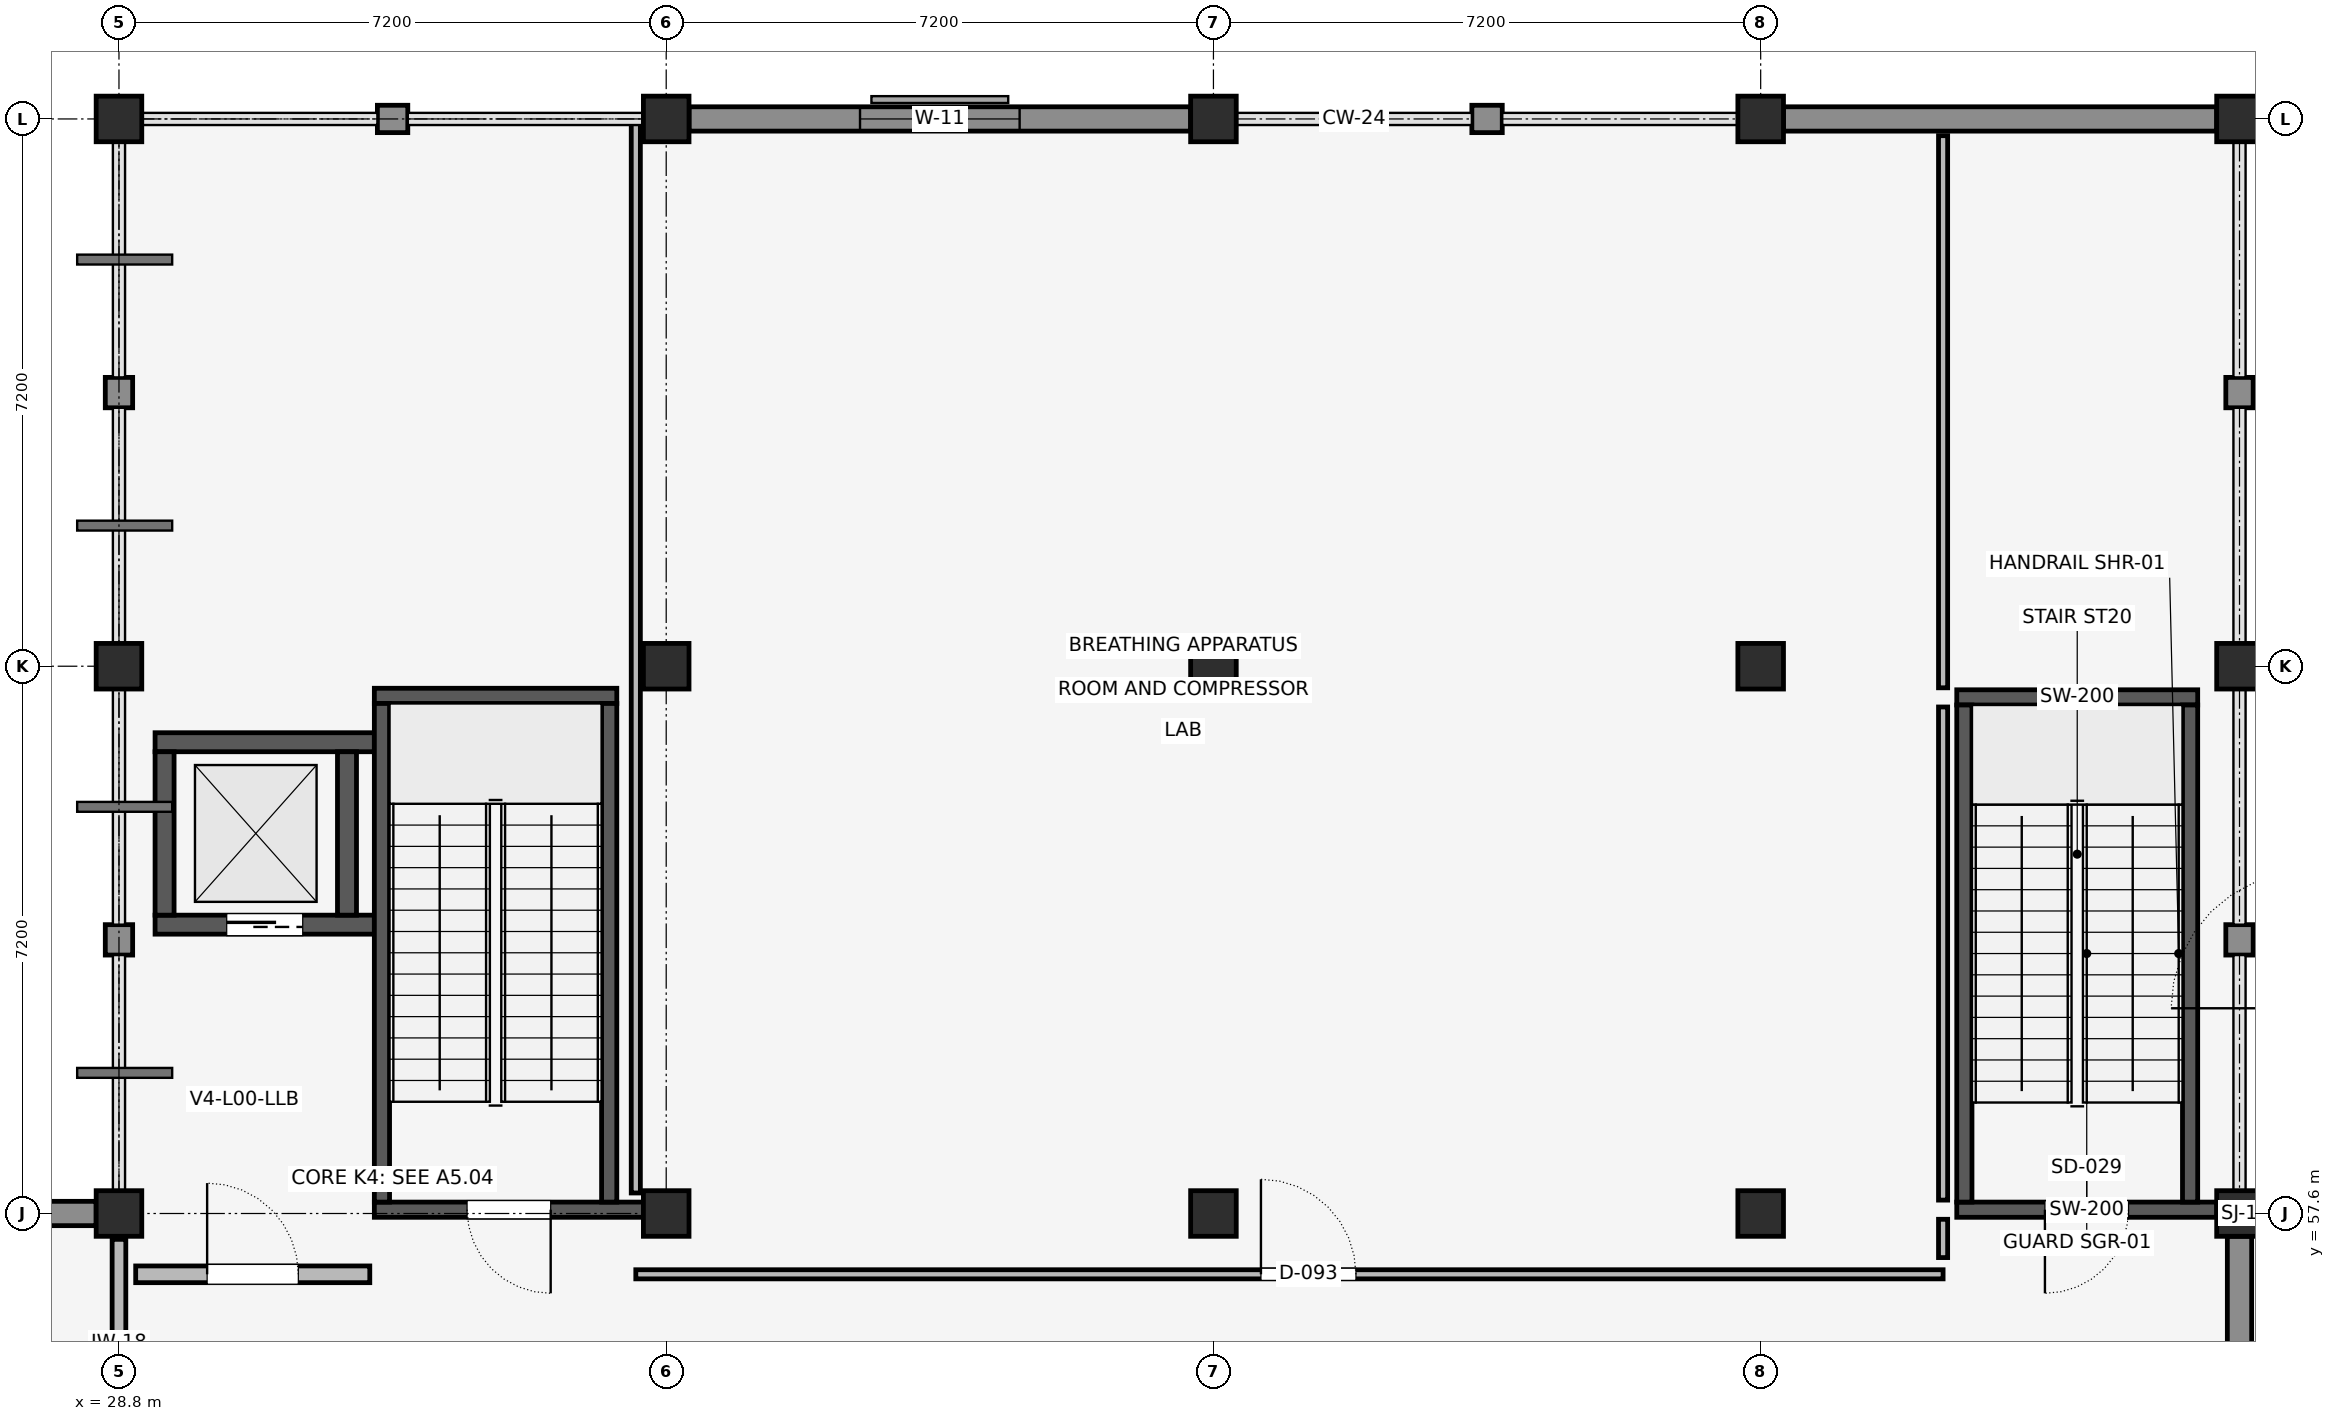
"""IFC4 building model, lengths in metres.
Left out: names, types, materials, properties, quantities, classifications, styles, units other than length and angle.
Written with IfcOpenShell. Run it as: python <this file> out.ifc"""

import sys

from ifc_helpers import new_model, si_unit, direction, frame, frame_2d, origin, origin_2d, place, context, subcontext, project, spatial, rectangle, extrude, element, fill, save


model = new_model("IFC4")
c1 = context("Model", 3, precision=1e-05, world=origin(), true_north=direction((0.0, 1.0)))
c2 = subcontext(c1, "Body", "Model", "MODEL_VIEW")
j1 = project(units=[si_unit("LENGTHUNIT", "METRE"), si_unit("PLANEANGLEUNIT", "RADIAN")], contexts=[c1])
p1 = place(None, origin())
s1 = spatial("IfcSite", under=j1, at=p1, CompositionType="ELEMENT")
p2 = place(p1, origin())
s2 = spatial("IfcBuilding", under=s1, at=p2, CompositionType="ELEMENT")
p3 = place(p2, origin())
s3 = spatial("IfcBuildingStorey", under=s2, at=p3, CompositionType="ELEMENT", Elevation=0.0)
for number, where, z_axis, x_axis in (
    (1, (28.8, 57.6, 0.0), (0.0, 0.0, 1.0), (1.0, 0.0, 0.0)),
    (2, (28.8, 64.8, 0.0), (0.0, 0.0, 1.0), (1.0, 0.0, 0.0)),
    (3, (28.8, 72.0, 0.0), (0.0, 0.0, 1.0), (1.0, 0.0, 0.0)),
    (4, (36.0, 57.6, 0.0), (0.0, 0.0, 1.0), (1.0, 0.0, 0.0)),
    (5, (36.0, 64.8, 0.0), (0.0, 0.0, 1.0), (1.0, 0.0, 0.0)),
    (6, (36.0, 72.0, 0.0), (0.0, 0.0, 1.0), (1.0, 0.0, 0.0)),
    (7, (43.2, 57.6, 0.0), (0.0, 0.0, 1.0), (1.0, 0.0, 0.0)),
    (8, (43.2, 64.8, 0.0), (0.0, 0.0, 1.0), (1.0, 0.0, 0.0)),
    (9, (43.2, 72.0, 0.0), (0.0, 0.0, 1.0), (1.0, 0.0, 0.0)),
    (10, (50.4, 57.6, 0.0), (0.0, 0.0, 1.0), (1.0, 0.0, 0.0)),
    (11, (50.4, 64.8, 0.0), (0.0, 0.0, 1.0), (1.0, 0.0, 0.0)),
    (12, (50.4, 72.0, 0.0), (0.0, 0.0, 1.0), (1.0, 0.0, 0.0)),
    (13, (56.7, 57.6, 0.0), (0.0, 0.0, 1.0), (1.0, 0.0, 0.0)),
    (14, (56.7, 64.8, 0.0), (0.0, 0.0, 1.0), (1.0, 0.0, 0.0)),
    (15, (56.7, 72.0, 0.0), (0.0, 0.0, 1.0), (1.0, 0.0, 0.0)),
):
    element("IfcColumn", number, at=place(p3, frame(where, z_axis=z_axis, x_axis=x_axis)), inside=s3, PredefinedType="COLUMN", context=c2, shape_type="SweptSolid", body=[
        extrude(rectangle(XDim=0.6, YDim=0.6, at=origin_2d()), origin(), (0.0, 0.0, 1.0), 5.4),
    ])
p4 = place(p3, frame((29.275, 61.4, 0.0), z_axis=(0.0, 0.0, 1.0), x_axis=(1.0, 0.0, 0.0)))
e16 = element("IfcWall", 16, at=p4, inside=s3, PredefinedType="SHEAR", context=c2, shape_type="SweptSolid", body=[
    extrude(rectangle(XDim=2.885, YDim=0.25, at=frame_2d((1.442, 0.0))), origin(), (0.0, 0.0, 1.0), 5.15),
])
p5 = place(p4, frame((0.942, 0.0, 0.0)))
e17 = element("IfcOpeningElement", 17, at=p5, cuts=e16, PredefinedType="OPENING", context=c2, shape_type="SweptSolid", body=[
    extrude(rectangle(XDim=1.0, YDim=2.1, at=frame_2d((0.5, 1.05))), frame((0.0, 0.137, 0.0), z_axis=(0.0, -1.0, 0.0), x_axis=(1.0, 0.0, 0.0)), (0.0, 0.0, 1.0), 0.274),
])
p6 = place(p3, frame((29.275, 63.8, 0.0), z_axis=(0.0, 0.0, 1.0), x_axis=(1.0, 0.0, 0.0)))
e18 = element("IfcWall", 18, at=p6, inside=s3, PredefinedType="SHEAR", context=c2, shape_type="SweptSolid", body=[
    extrude(rectangle(XDim=2.885, YDim=0.25, at=frame_2d((1.442, 0.0))), origin(), (0.0, 0.0, 1.0), 5.15),
])
for number, where, z_axis, x_axis in (
    (19, (29.4, 61.525, 0.0), (0.0, 0.0, 1.0), (0.0, 1.0, 0.0)),
    (20, (31.8, 61.525, 0.0), (0.0, 0.0, 1.0), (0.0, 1.0, 0.0)),
):
    element("IfcWall", number, at=place(p3, frame(where, z_axis=z_axis, x_axis=x_axis)), inside=s3, PredefinedType="SHEAR", context=c2, shape_type="SweptSolid", body=[
        extrude(rectangle(XDim=2.15, YDim=0.25, at=frame_2d((1.075, 0.0))), origin(), (0.0, 0.0, 1.0), 5.15),
    ])
p7 = place(p3, frame((32.16, 57.65, 0.0), z_axis=(0.0, 0.0, 1.0), x_axis=(1.0, 0.0, 0.0)))
e21 = element("IfcWall", 21, at=p7, inside=s3, PredefinedType="SHEAR", context=c2, shape_type="SweptSolid", body=[
    extrude(rectangle(XDim=3.54, YDim=0.2, at=frame_2d((1.77, 0.0))), origin(), (0.0, 0.0, 1.0), 5.15),
])
p8 = place(p7, frame((1.22, 0.0, 0.0)))
e22 = element("IfcOpeningElement", 22, at=p8, cuts=e21, PredefinedType="OPENING", context=c2, shape_type="SweptSolid", body=[
    extrude(rectangle(XDim=1.1, YDim=2.15, at=frame_2d((0.55, 1.075))), frame((0.0, 0.112, 0.0), z_axis=(0.0, -1.0, 0.0), x_axis=(1.0, 0.0, 0.0)), (0.0, 0.0, 1.0), 0.224),
])
p9 = place(p3, frame((32.16, 64.41, 0.0), z_axis=(0.0, 0.0, 1.0), x_axis=(1.0, 0.0, 0.0)))
e23 = element("IfcWall", 23, at=p9, inside=s3, PredefinedType="SHEAR", context=c2, shape_type="SweptSolid", body=[
    extrude(rectangle(XDim=3.19, YDim=0.2, at=frame_2d((1.595, 0.0))), origin(), (0.0, 0.0, 1.0), 5.15),
])
for number, where, z_axis, x_axis in (
    (24, (32.26, 57.75, 0.0), (0.0, 0.0, 1.0), (0.0, 1.0, 0.0)),
    (25, (35.25, 57.75, 0.0), (0.0, 0.0, 1.0), (0.0, 1.0, 0.0)),
):
    element("IfcWall", number, at=place(p3, frame(where, z_axis=z_axis, x_axis=x_axis)), inside=s3, PredefinedType="SHEAR", context=c2, shape_type="SweptSolid", body=[
        extrude(rectangle(XDim=6.56, YDim=0.2, at=frame_2d((3.28, 0.0))), origin(), (0.0, 0.0, 1.0), 5.15),
    ])
p10 = place(p3, frame((52.98, 57.65, 0.0), z_axis=(0.0, 0.0, 1.0), x_axis=(1.0, 0.0, 0.0)))
e26 = element("IfcWall", 26, at=p10, inside=s3, PredefinedType="SHEAR", context=c2, shape_type="SweptSolid", body=[
    extrude(rectangle(XDim=3.42, YDim=0.2, at=frame_2d((1.71, 0.0))), origin(), (0.0, 0.0, 1.0), 5.15),
])
p11 = place(p10, frame((1.16, 0.0, 0.0)))
e27 = element("IfcOpeningElement", 27, at=p11, cuts=e26, PredefinedType="OPENING", context=c2, shape_type="SweptSolid", body=[
    extrude(rectangle(XDim=1.1, YDim=2.15, at=frame_2d((0.55, 1.075))), frame((0.0, 0.112, 0.0), z_axis=(0.0, -1.0, 0.0), x_axis=(1.0, 0.0, 0.0)), (0.0, 0.0, 1.0), 0.224),
])
p12 = place(p3, frame((52.98, 64.39, 0.0), z_axis=(0.0, 0.0, 1.0), x_axis=(1.0, 0.0, 0.0)))
e28 = element("IfcWall", 28, at=p12, inside=s3, PredefinedType="SHEAR", context=c2, shape_type="SweptSolid", body=[
    extrude(rectangle(XDim=3.17, YDim=0.2, at=frame_2d((1.585, 0.0))), origin(), (0.0, 0.0, 1.0), 5.15),
])
for number, where, z_axis, x_axis in (
    (29, (53.08, 57.75, 0.0), (0.0, 0.0, 1.0), (0.0, 1.0, 0.0)),
    (30, (56.05, 57.75, 0.0), (0.0, 0.0, 1.0), (0.0, 1.0, 0.0)),
):
    element("IfcWall", number, at=place(p3, frame(where, z_axis=z_axis, x_axis=x_axis)), inside=s3, PredefinedType="SHEAR", context=c2, shape_type="SweptSolid", body=[
        extrude(rectangle(XDim=6.54, YDim=0.2, at=frame_2d((3.27, 0.0))), origin(), (0.0, 0.0, 1.0), 5.15),
    ])
p13 = place(p3, frame((21.9, 57.6, 0.0), z_axis=(0.0, 0.0, 1.0), x_axis=(1.0, 0.0, 0.0)))
e31 = element("IfcWall", 31, at=p13, inside=s3, PredefinedType="ELEMENTEDWALL", context=c2, shape_type="SweptSolid", body=[
    extrude(rectangle(XDim=6.6, YDim=0.32, at=frame_2d((3.3, 0.0))), origin(), (0.0, 0.0, 1.0), 4.4),
])
p14 = place(p13, frame((2.625, 0.0, 0.85)))
e32 = element("IfcOpeningElement", 32, at=p14, cuts=e31, PredefinedType="OPENING", context=c2, shape_type="SweptSolid", body=[
    extrude(rectangle(XDim=1.35, YDim=2.0, at=frame_2d((0.675, 1.0))), frame((0.0, 0.172, 0.0), z_axis=(0.0, -1.0, 0.0), x_axis=(1.0, 0.0, 0.0)), (0.0, 0.0, 1.0), 0.344),
])
p15 = place(p3, frame((28.8, 61.0, 0.0), z_axis=(0.0, 0.0, 1.0), x_axis=(0.0, 1.0, 0.0)))
e33 = element("IfcWall", 33, at=p15, inside=s3, PredefinedType="SOLIDWALL", context=c2, shape_type="SweptSolid", body=[
    extrude(rectangle(XDim=0.4, YDim=0.36, at=frame_2d((0.2, 0.0))), origin(), (0.0, 0.0, 1.0), 4.54),
])
for number, where, z_axis, x_axis in (
    (34, (28.8, 68.2, 0.0), (0.0, 0.0, 1.0), (0.0, 1.0, 0.0)),
    (35, (32.2, 72.0, 0.0), (0.0, 0.0, 1.0), (1.0, 0.0, 0.0)),
):
    element("IfcWall", number, at=place(p3, frame(where, z_axis=z_axis, x_axis=x_axis)), inside=s3, PredefinedType="SOLIDWALL", context=c2, shape_type="SweptSolid", body=[
        extrude(rectangle(XDim=0.4, YDim=0.36, at=frame_2d((0.2, 0.0))), origin(), (0.0, 0.0, 1.0), 4.49),
    ])
p16 = place(p3, frame((36.3, 72.0, 0.0), z_axis=(0.0, 0.0, 1.0), x_axis=(1.0, 0.0, 0.0)))
e36 = element("IfcWall", 36, at=p16, inside=s3, PredefinedType="ELEMENTEDWALL", context=c2, shape_type="SweptSolid", body=[
    extrude(rectangle(XDim=6.6, YDim=0.32, at=frame_2d((3.3, 0.0))), origin(), (0.0, 0.0, 1.0), 4.49),
])
p17 = place(p16, frame((2.25, 0.0, 0.85)))
e37 = element("IfcOpeningElement", 37, at=p17, cuts=e36, PredefinedType="OPENING", context=c2, shape_type="SweptSolid", body=[
    extrude(rectangle(XDim=2.1, YDim=2.15, at=frame_2d((1.05, 1.075))), frame((0.0, 0.172, 0.0), z_axis=(0.0, -1.0, 0.0), x_axis=(1.0, 0.0, 0.0)), (0.0, 0.0, 1.0), 0.344),
])
p18 = place(p3, frame((46.6, 72.0, 0.0), z_axis=(0.0, 0.0, 1.0), x_axis=(1.0, 0.0, 0.0)))
e38 = element("IfcWall", 38, at=p18, inside=s3, PredefinedType="SOLIDWALL", context=c2, shape_type="SweptSolid", body=[
    extrude(rectangle(XDim=0.4, YDim=0.36, at=frame_2d((0.2, 0.0))), origin(), (0.0, 0.0, 1.0), 4.49),
])
p19 = place(p3, frame((50.7, 72.0, 0.0), z_axis=(0.0, 0.0, 1.0), x_axis=(1.0, 0.0, 0.0)))
e39 = element("IfcWall", 39, at=p19, inside=s3, PredefinedType="ELEMENTEDWALL", context=c2, shape_type="SweptSolid", body=[
    extrude(rectangle(XDim=5.7, YDim=0.32, at=frame_2d((2.85, 0.0))), origin(), (0.0, 0.0, 1.0), 4.49),
])
p20 = place(p3, frame((56.7, 68.6, 0.0), z_axis=(0.0, 0.0, 1.0), x_axis=(0.0, -1.0, 0.0)))
e40 = element("IfcWall", 40, at=p20, inside=s3, PredefinedType="SOLIDWALL", context=c2, shape_type="SweptSolid", body=[
    extrude(rectangle(XDim=0.4, YDim=0.36, at=frame_2d((0.2, 0.0))), origin(), (0.0, 0.0, 1.0), 4.49),
])
p21 = place(p3, frame((56.7, 61.4, 0.0), z_axis=(0.0, 0.0, 1.0), x_axis=(0.0, -1.0, 0.0)))
e41 = element("IfcWall", 41, at=p21, inside=s3, PredefinedType="SOLIDWALL", context=c2, shape_type="SweptSolid", body=[
    extrude(rectangle(XDim=0.4, YDim=0.36, at=frame_2d((0.2, 0.0))), origin(), (0.0, 0.0, 1.0), 4.54),
])
p22 = place(p3, frame((56.7, 57.3, 0.0), z_axis=(0.0, 0.0, 1.0), x_axis=(0.0, -1.0, 0.0)))
e42 = element("IfcWall", 42, at=p22, inside=s3, PredefinedType="ELEMENTEDWALL", context=c2, shape_type="SweptSolid", body=[
    extrude(rectangle(XDim=6.6, YDim=0.32, at=frame_2d((3.3, 0.0))), origin(), (0.0, 0.0, 1.0), 4.49),
])
p23 = place(p22, frame((2.4, 0.0, 0.0)))
e43 = element("IfcOpeningElement", 43, at=p23, cuts=e42, PredefinedType="OPENING", context=c2, shape_type="SweptSolid", body=[
    extrude(rectangle(XDim=1.8, YDim=2.2, at=frame_2d((0.9, 1.1))), frame((0.0, 0.172, 0.0), z_axis=(0.0, -1.0, 0.0), x_axis=(1.0, 0.0, 0.0)), (0.0, 0.0, 1.0), 0.344),
])
p24 = place(p3, frame((28.8, 54.52, 0.0), z_axis=(0.0, 0.0, 1.0), x_axis=(0.0, 1.0, 0.0)))
e44 = element("IfcWall", 44, at=p24, inside=s3, PredefinedType="PLUMBINGWALL", context=c2, shape_type="SweptSolid", body=[
    extrude(rectangle(XDim=2.74, YDim=0.18, at=frame_2d((1.37, 0.0))), origin(), (0.0, 0.0, 1.0), 4.488),
])
p25 = place(p3, frame((29.02, 56.8, 0.0), z_axis=(0.0, 0.0, 1.0), x_axis=(1.0, 0.0, 0.0)))
e45 = element("IfcWall", 45, at=p25, inside=s3, PredefinedType="STANDARD", context=c2, shape_type="SweptSolid", body=[
    extrude(rectangle(XDim=3.08, YDim=0.22, at=frame_2d((1.54, 0.0))), origin(), (0.0, 0.0, 1.0), 5.12),
])
p26 = place(p25, frame((0.94, 0.0, 0.0)))
e46 = element("IfcOpeningElement", 46, at=p26, cuts=e45, PredefinedType="OPENING", context=c2, shape_type="SweptSolid", body=[
    extrude(rectangle(XDim=1.2, YDim=2.2, at=frame_2d((0.6, 1.1))), frame((0.0, 0.122, 0.0), z_axis=(0.0, -1.0, 0.0), x_axis=(1.0, 0.0, 0.0)), (0.0, 0.0, 1.0), 0.244),
])
p27 = place(p3, frame((35.6, 56.8, 0.0), z_axis=(0.0, 0.0, 1.0), x_axis=(1.0, 0.0, 0.0)))
e47 = element("IfcWall", 47, at=p27, inside=s3, PredefinedType="PARTITIONING", context=c2, shape_type="SweptSolid", body=[
    extrude(rectangle(XDim=17.2, YDim=0.12, at=frame_2d((8.6, 0.0))), origin(), (0.0, 0.0, 1.0), 4.488),
])
p28 = place(p27, frame((8.225, 0.0, 0.0)))
e48 = element("IfcOpeningElement", 48, at=p28, cuts=e47, PredefinedType="OPENING", context=c2, shape_type="SweptSolid", body=[
    extrude(rectangle(XDim=1.25, YDim=2.15, at=frame_2d((0.625, 1.075))), frame((0.0, 0.072, 0.0), z_axis=(0.0, -1.0, 0.0), x_axis=(1.0, 0.0, 0.0)), (0.0, 0.0, 1.0), 0.144),
])
p29 = place(p3, frame((52.8, 57.02, 0.0), z_axis=(0.0, 0.0, 1.0), x_axis=(0.0, 1.0, 0.0)))
e49 = element("IfcWall", 49, at=p29, inside=s3, PredefinedType="PARTITIONING", context=c2, shape_type="SweptSolid", body=[
    extrude(rectangle(XDim=0.504, YDim=0.12, at=frame_2d((0.252, 0.0))), origin(), (0.0, 0.0, 1.0), 5.12),
])
p30 = place(p3, frame((52.8, 57.776, 0.0), z_axis=(0.0, 0.0, 1.0), x_axis=(0.0, 1.0, 0.0)))
e50 = element("IfcWall", 50, at=p30, inside=s3, PredefinedType="PARTITIONING", context=c2, shape_type="SweptSolid", body=[
    extrude(rectangle(XDim=6.488, YDim=0.12, at=frame_2d((3.244, 0.0))), origin(), (0.0, 0.0, 1.0), 5.12),
])
p31 = place(p3, frame((52.8, 64.516, 0.0), z_axis=(0.0, 0.0, 1.0), x_axis=(0.0, 1.0, 0.0)))
e51 = element("IfcWall", 51, at=p31, inside=s3, PredefinedType="PARTITIONING", context=c2, shape_type="SweptSolid", body=[
    extrude(rectangle(XDim=7.264, YDim=0.12, at=frame_2d((3.632, 0.0))), origin(), (0.0, 0.0, 1.0), 4.388),
])
p32 = place(p3, frame((35.6, 57.87, 0.0), z_axis=(0.0, 0.0, 1.0), x_axis=(0.0, 1.0, 0.0)))
e52 = element("IfcWall", 52, at=p32, inside=s3, PredefinedType="PARTITIONING", context=c2, shape_type="SweptSolid", body=[
    extrude(rectangle(XDim=14.13, YDim=0.12, at=frame_2d((7.065, 0.0))), origin(), (0.0, 0.0, 1.0), 4.438),
])
p33 = place(p17, origin())
e53 = element("IfcWindow", 53, at=p33, inside=s3, PartitioningType="SINGLE_PANEL", PredefinedType="WINDOW", context=c2, shape_type="SweptSolid", body=[
    extrude(rectangle(XDim=2.1, YDim=2.15, at=frame_2d((1.05, 1.075))), frame((0.0, 0.03, 0.0), z_axis=(0.0, -1.0, 0.0), x_axis=(1.0, 0.0, 0.0)), (0.0, 0.0, 1.0), 0.06),
])
fill(e37, e53)
p34 = place(p8, frame((1.1, 0.0, 0.0), z_axis=(0.0, 0.0, 1.0), x_axis=(-1.0, 0.0, 0.0)))
e54 = element("IfcDoor", 54, at=p34, inside=s3, OperationType="SINGLE_SWING_LEFT", PredefinedType="DOOR", context=c2, shape_type="SweptSolid", body=[
    extrude(rectangle(XDim=1.1, YDim=2.15, at=frame_2d((0.55, 1.075))), frame((0.0, 0.025, 0.0), z_axis=(0.0, -1.0, 0.0), x_axis=(1.0, 0.0, 0.0)), (0.0, 0.0, 1.0), 0.05),
])
fill(e22, e54)
p35 = place(p11, frame((1.1, 0.0, 0.0), z_axis=(0.0, 0.0, 1.0), x_axis=(-1.0, 0.0, 0.0)))
e55 = element("IfcDoor", 55, at=p35, inside=s3, OperationType="SINGLE_SWING_RIGHT", PredefinedType="DOOR", context=c2, shape_type="SweptSolid", body=[
    extrude(rectangle(XDim=1.1, YDim=2.15, at=frame_2d((0.55, 1.075))), frame((0.0, 0.025, 0.0), z_axis=(0.0, -1.0, 0.0), x_axis=(1.0, 0.0, 0.0)), (0.0, 0.0, 1.0), 0.05),
])
fill(e27, e55)
p36 = place(p5, origin())
e56 = element("IfcDoor", 56, at=p36, inside=s3, OperationType="SLIDING_TO_RIGHT", PredefinedType="DOOR", context=c2, shape_type="SweptSolid", body=[
    extrude(rectangle(XDim=1.0, YDim=2.1, at=frame_2d((0.5, 1.05))), frame((0.0, 0.025, 0.0), z_axis=(0.0, -1.0, 0.0), x_axis=(1.0, 0.0, 0.0)), (0.0, 0.0, 1.0), 0.05),
])
fill(e17, e56)
p37 = place(p26, origin())
e57 = element("IfcDoor", 57, at=p37, inside=s3, OperationType="SINGLE_SWING_LEFT", PredefinedType="DOOR", context=c2, shape_type="SweptSolid", body=[
    extrude(rectangle(XDim=1.2, YDim=2.2, at=frame_2d((0.6, 1.1))), frame((0.0, 0.025, 0.0), z_axis=(0.0, -1.0, 0.0), x_axis=(1.0, 0.0, 0.0)), (0.0, 0.0, 1.0), 0.05),
])
fill(e46, e57)
p38 = place(p28, origin())
e58 = element("IfcDoor", 58, at=p38, inside=s3, OperationType="SINGLE_SWING_LEFT", PredefinedType="DOOR", context=c2, shape_type="SweptSolid", body=[
    extrude(rectangle(XDim=1.25, YDim=2.15, at=frame_2d((0.625, 1.075))), frame((0.0, 0.025, 0.0), z_axis=(0.0, -1.0, 0.0), x_axis=(1.0, 0.0, 0.0)), (0.0, 0.0, 1.0), 0.05),
])
fill(e48, e58)
save(model, sys.argv[1])
